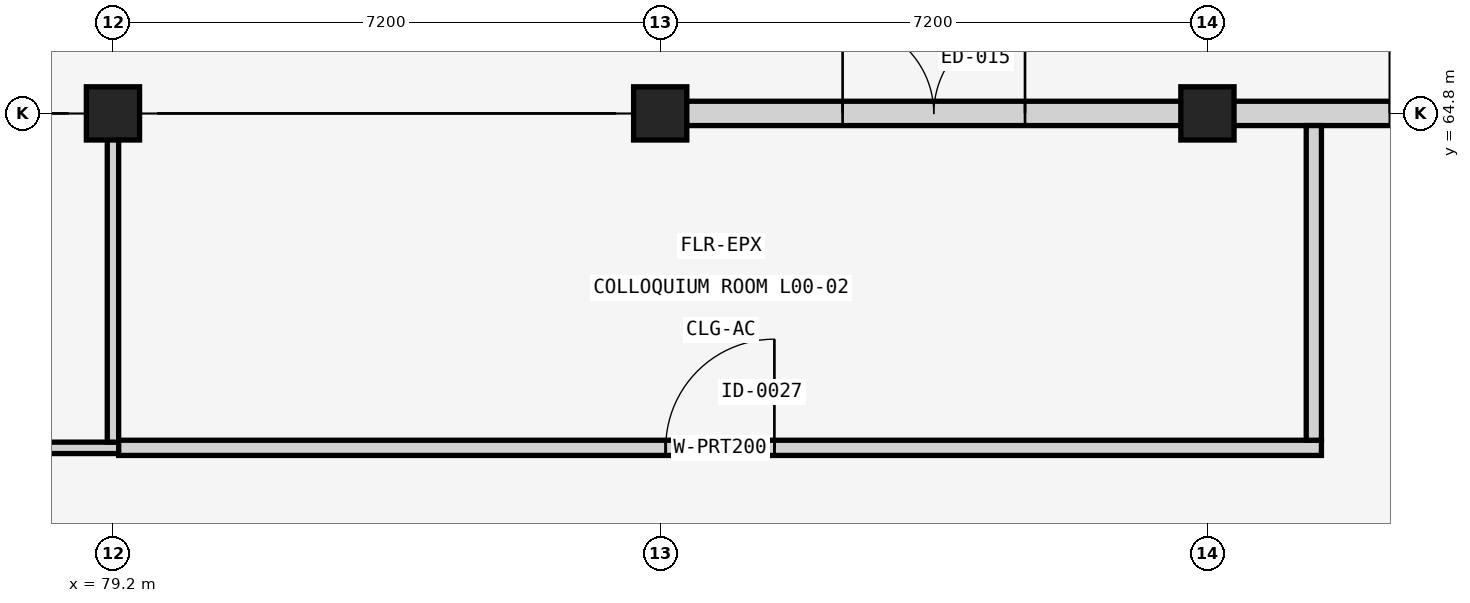
"""IFC4 building model, lengths in metres.
Left out: names, types, materials, properties, quantities, classifications, styles, units other than length and angle.
Written with IfcOpenShell. Run it as: python <this file> out.ifc"""

import sys

from ifc_helpers import new_model, si_unit, direction, frame, frame_2d, origin, origin_2d, place, context, subcontext, project, spatial, rectangle, extrude, element, fill, save


model = new_model("IFC4")
c1 = context("Model", 3, precision=1e-05, world=origin(), true_north=direction((0.0, 1.0)))
c2 = subcontext(c1, "Body", "Model", "MODEL_VIEW")
j1 = project(units=[si_unit("LENGTHUNIT", "METRE"), si_unit("PLANEANGLEUNIT", "RADIAN")], contexts=[c1])
p1 = place(None, origin())
s1 = spatial("IfcSite", under=j1, at=p1, CompositionType="ELEMENT")
p2 = place(p1, origin())
s2 = spatial("IfcBuilding", under=s1, at=p2, CompositionType="ELEMENT")
p3 = place(p2, origin())
s3 = spatial("IfcBuildingStorey", under=s2, at=p3, CompositionType="ELEMENT", Elevation=0.0)
for number, where, z_axis, x_axis in (
    (1, (79.2, 64.8, 0.0), (0.0, 0.0, 1.0), (1.0, 0.0, 0.0)),
    (2, (86.4, 64.8, 0.0), (0.0, 0.0, 1.0), (1.0, 0.0, 0.0)),
    (3, (93.6, 64.8, 0.0), (0.0, 0.0, 1.0), (1.0, 0.0, 0.0)),
):
    element("IfcColumn", number, at=place(p3, frame(where, z_axis=z_axis, x_axis=x_axis)), inside=s3, PredefinedType="COLUMN", context=c2, shape_type="SweptSolid", body=[
        extrude(rectangle(XDim=0.7, YDim=0.7, at=origin_2d()), origin(), (0.0, 0.0, 1.0), 4.8),
    ])
p4 = place(p3, frame((86.74, 64.8, 0.0), z_axis=(0.0, 0.0, 1.0), x_axis=(1.0, 0.0, 0.0)))
e4 = element("IfcWall", 4, at=p4, inside=s3, PredefinedType="SOLIDWALL", context=c2, shape_type="SweptSolid", body=[
    extrude(rectangle(XDim=6.52, YDim=0.32, at=frame_2d((3.26, 0.0))), origin(), (0.0, 0.0, 1.0), 3.75),
])
p5 = place(p4, frame((2.06, 0.0, 0.0)))
e5 = element("IfcOpeningElement", 5, at=p5, cuts=e4, PredefinedType="OPENING", context=c2, shape_type="SweptSolid", body=[
    extrude(rectangle(XDim=2.4, YDim=2.5, at=frame_2d((1.2, 1.25))), frame((0.0, 0.17, 0.0), z_axis=(0.0, -1.0, 0.0), x_axis=(1.0, 0.0, 0.0)), (0.0, 0.0, 1.0), 0.34),
])
p6 = place(p3, frame((93.94, 64.8, 0.0), z_axis=(0.0, 0.0, 1.0), x_axis=(1.0, 0.0, 0.0)))
e6 = element("IfcWall", 6, at=p6, inside=s3, PredefinedType="SOLIDWALL", context=c2, shape_type="SweptSolid", body=[
    extrude(rectangle(XDim=6.52, YDim=0.32, at=frame_2d((3.26, 0.0))), origin(), (0.0, 0.0, 1.0), 3.75),
])
p7 = place(p6, frame((2.06, 0.0, 0.0)))
e7 = element("IfcOpeningElement", 7, at=p7, cuts=e6, PredefinedType="OPENING", context=c2, shape_type="SweptSolid", body=[
    extrude(rectangle(XDim=2.4, YDim=2.5, at=frame_2d((1.2, 1.25))), frame((0.0, 0.17, 0.0), z_axis=(0.0, -1.0, 0.0), x_axis=(1.0, 0.0, 0.0)), (0.0, 0.0, 1.0), 0.34),
])
p8 = place(p3, frame((43.325, 60.4, 0.0), z_axis=(0.0, 0.0, 1.0), x_axis=(1.0, 0.0, 0.0)))
e8 = element("IfcWall", 8, at=p8, inside=s3, PredefinedType="PARTITIONING", context=c2, shape_type="SweptSolid", body=[
    extrude(rectangle(XDim=35.95, YDim=0.15, at=frame_2d((17.975, 0.0))), origin(), (0.0, 0.0, 1.0), 3.75),
])
p9 = place(p8, frame((17.285, 0.0, 0.0)))
e9 = element("IfcOpeningElement", 9, at=p9, cuts=e8, PredefinedType="OPENING", context=c2, shape_type="SweptSolid", body=[
    extrude(rectangle(XDim=1.38, YDim=2.12, at=frame_2d((0.69, 1.06))), frame((0.0, 0.085, 0.0), z_axis=(0.0, -1.0, 0.0), x_axis=(1.0, 0.0, 0.0)), (0.0, 0.0, 1.0), 0.17),
])
p10 = place(p3, frame((79.2, 60.475, 0.0), z_axis=(0.0, 0.0, 1.0), x_axis=(0.0, 1.0, 0.0)))
e10 = element("IfcWall", 10, at=p10, inside=s3, PredefinedType="PARTITIONING", context=c2, shape_type="SweptSolid", body=[
    extrude(rectangle(XDim=4.05, YDim=0.15, at=frame_2d((2.025, 0.0))), origin(), (0.0, 0.0, 1.0), 3.75),
])
p11 = place(p3, frame((79.275, 60.4, 0.0), z_axis=(0.0, 0.0, 1.0), x_axis=(1.0, 0.0, 0.0)))
e11 = element("IfcWall", 11, at=p11, inside=s3, PredefinedType="PARTITIONING", context=c2, shape_type="SweptSolid", body=[
    extrude(rectangle(XDim=15.825, YDim=0.2, at=frame_2d((7.913, 0.0))), origin(), (0.0, 0.0, 1.0), 3.75),
])
p12 = place(p11, frame((7.198, 0.0, 0.0)))
e12 = element("IfcOpeningElement", 12, at=p12, cuts=e11, PredefinedType="OPENING", context=c2, shape_type="SweptSolid", body=[
    extrude(rectangle(XDim=1.43, YDim=2.18, at=frame_2d((0.715, 1.09))), frame((0.0, 0.11, 0.0), z_axis=(0.0, -1.0, 0.0), x_axis=(1.0, 0.0, 0.0)), (0.0, 0.0, 1.0), 0.22),
])
p13 = place(p3, frame((95.0, 60.5, 0.0), z_axis=(0.0, 0.0, 1.0), x_axis=(0.0, 1.0, 0.0)))
e13 = element("IfcWall", 13, at=p13, inside=s3, PredefinedType="PARTITIONING", context=c2, shape_type="SweptSolid", body=[
    extrude(rectangle(XDim=4.14, YDim=0.2, at=frame_2d((2.07, 0.0))), origin(), (0.0, 0.0, 1.0), 3.85),
])
p14 = place(p5, origin())
e14 = element("IfcDoor", 14, at=p14, inside=s3, OperationType="DOUBLE_DOOR_SINGLE_SWING", PredefinedType="DOOR", context=c2, shape_type="SweptSolid", body=[
    extrude(rectangle(XDim=2.4, YDim=2.5, at=frame_2d((1.2, 1.25))), frame((0.0, 0.025, 0.0), z_axis=(0.0, -1.0, 0.0), x_axis=(1.0, 0.0, 0.0)), (0.0, 0.0, 1.0), 0.05),
])
fill(e5, e14)
p15 = place(p12, origin())
e15 = element("IfcDoor", 15, at=p15, inside=s3, OperationType="SINGLE_SWING_RIGHT", PredefinedType="DOOR", context=c2, shape_type="SweptSolid", body=[
    extrude(rectangle(XDim=1.43, YDim=2.18, at=frame_2d((0.715, 1.09))), frame((0.0, 0.025, 0.0), z_axis=(0.0, -1.0, 0.0), x_axis=(1.0, 0.0, 0.0)), (0.0, 0.0, 1.0), 0.05),
])
fill(e12, e15)
save(model, sys.argv[1])
